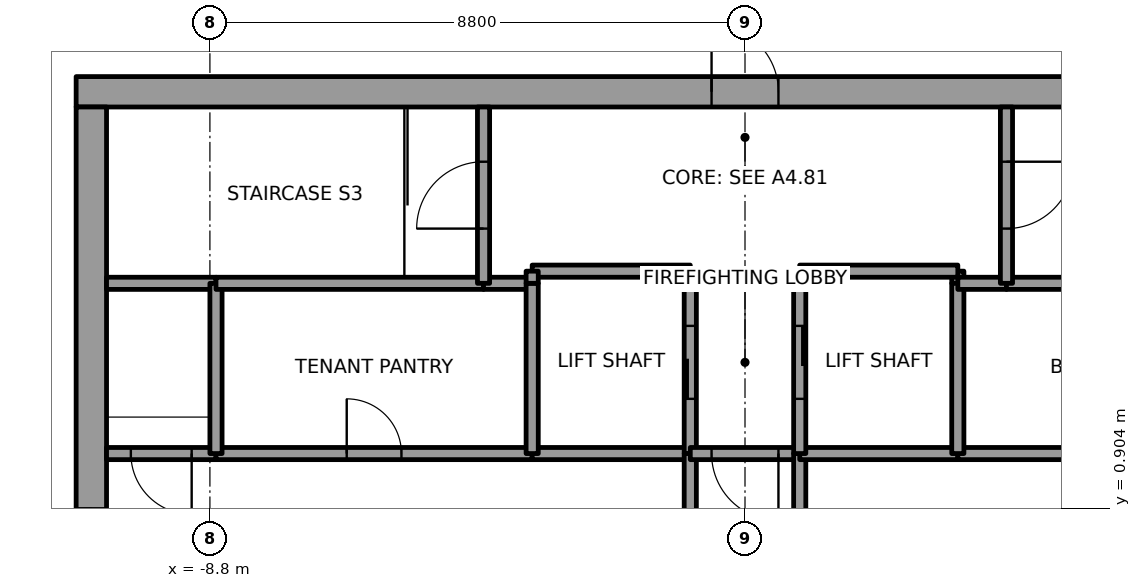
"""IFC4 building model, lengths in metres.
Left out: names, types, materials, properties, quantities, classifications, styles, units other than length and angle.
Written with IfcOpenShell. Run it as: python <this file> out.ifc"""

import sys

from ifc_helpers import new_model, si_unit, direction, frame, frame_2d, origin, place, context, subcontext, project, spatial, rectangle, extrude, element, fill, save


model = new_model("IFC4")
c1 = context("Model", 3, precision=1e-05, world=origin(), true_north=direction((0.0, 1.0)))
c2 = subcontext(c1, "Body", "Model", "MODEL_VIEW")
j1 = project(units=[si_unit("LENGTHUNIT", "METRE"), si_unit("PLANEANGLEUNIT", "RADIAN")], contexts=[c1])
p1 = place(None, origin())
s1 = spatial("IfcSite", under=j1, at=p1, CompositionType="ELEMENT")
p2 = place(p1, origin())
s2 = spatial("IfcBuilding", under=s1, at=p2, CompositionType="ELEMENT")
p3 = place(p2, frame((0.0, 0.0, 355.6)))
s3 = spatial("IfcBuildingStorey", under=s2, at=p3, CompositionType="ELEMENT", Elevation=355.6)
p4 = place(p3, frame((-11.0, 7.75, 0.0), z_axis=(0.0, 0.0, 1.0), x_axis=(1.0, 0.0, 0.0)))
e1 = element("IfcWall", 1, at=p4, inside=s3, PredefinedType="SHEAR", context=c2, shape_type="SweptSolid", body=[
    extrude(rectangle(XDim=22.0, YDim=0.5, at=frame_2d((11.0, 0.0))), origin(), (0.0, 0.0, 1.0), 5.4),
])
p5 = place(p4, frame((10.45, 0.0, 0.0)))
e2 = element("IfcOpeningElement", 2, at=p5, cuts=e1, PredefinedType="OPENING", context=c2, shape_type="SweptSolid", body=[
    extrude(rectangle(XDim=1.1, YDim=2.1, at=frame_2d((0.55, 1.05))), frame((0.0, 0.25, 0.0), z_axis=(0.0, -1.0, 0.0), x_axis=(1.0, 0.0, 0.0)), (0.0, 0.0, 1.0), 0.5),
])
p6 = place(p3, frame((-10.75, -7.5, 0.0), z_axis=(0.0, 0.0, 1.0), x_axis=(0.0, 1.0, 0.0)))
e3 = element("IfcWall", 3, at=p6, inside=s3, PredefinedType="SHEAR", context=c2, shape_type="SweptSolid", body=[
    extrude(rectangle(XDim=15.0, YDim=0.5, at=frame_2d((7.5, 0.0))), origin(), (0.0, 0.0, 1.0), 5.4),
])
p7 = place(p6, frame((6.6, 0.0, 0.0)))
e4 = element("IfcOpeningElement", 4, at=p7, cuts=e3, PredefinedType="OPENING", context=c2, shape_type="SweptSolid", body=[
    extrude(rectangle(XDim=1.8, YDim=2.1, at=frame_2d((0.9, 1.05))), frame((0.0, 0.25, 0.0), z_axis=(0.0, -1.0, 0.0), x_axis=(1.0, 0.0, 0.0)), (0.0, 0.0, 1.0), 0.5),
])
p8 = place(p3, frame((-8.7, 1.8, 0.0), z_axis=(0.0, 0.0, 1.0), x_axis=(-1.0, 0.0, 0.0)))
e5 = element("IfcWall", 5, at=p8, inside=s3, PredefinedType="SOLIDWALL", context=c2, shape_type="SweptSolid", body=[
    extrude(rectangle(XDim=1.8, YDim=0.2, at=frame_2d((0.9, 0.0))), origin(), (0.0, 0.0, 1.0), 5.25),
])
p9 = place(p8, frame((0.4, 0.0, 0.0)))
e6 = element("IfcOpeningElement", 6, at=p9, cuts=e5, PredefinedType="OPENING", context=c2, shape_type="SweptSolid", body=[
    extrude(rectangle(XDim=1.0, YDim=2.1, at=frame_2d((0.5, 1.05))), frame((0.0, 0.1, 0.0), z_axis=(0.0, -1.0, 0.0), x_axis=(1.0, 0.0, 0.0)), (0.0, 0.0, 1.0), 0.2),
])
p10 = place(p3, frame((-8.7, 4.6, 0.0), z_axis=(0.0, 0.0, 1.0), x_axis=(-1.0, 0.0, 0.0)))
e7 = element("IfcWall", 7, at=p10, inside=s3, PredefinedType="SOLIDWALL", context=c2, shape_type="SweptSolid", body=[
    extrude(rectangle(XDim=1.8, YDim=0.2, at=frame_2d((0.9, 0.0))), origin(), (0.0, 0.0, 1.0), 5.25),
])
p11 = place(p3, frame((-8.7, 1.8, 0.0), z_axis=(0.0, 0.0, 1.0), x_axis=(1.0, 0.0, 0.0)))
e8 = element("IfcWall", 8, at=p11, inside=s3, PredefinedType="SOLIDWALL", context=c2, shape_type="SweptSolid", body=[
    extrude(rectangle(XDim=5.2, YDim=0.2, at=frame_2d((2.6, 0.0))), origin(), (0.0, 0.0, 1.0), 5.25),
])
p12 = place(p11, frame((2.15, 0.0, 0.0)))
e9 = element("IfcOpeningElement", 9, at=p12, cuts=e8, PredefinedType="OPENING", context=c2, shape_type="SweptSolid", body=[
    extrude(rectangle(XDim=0.9, YDim=2.1, at=frame_2d((0.45, 1.05))), frame((0.0, 0.1, 0.0), z_axis=(0.0, -1.0, 0.0), x_axis=(1.0, 0.0, 0.0)), (0.0, 0.0, 1.0), 0.2),
])
p13 = place(p3, frame((-8.7, 4.6, 0.0), z_axis=(0.0, 0.0, 1.0), x_axis=(0.0, -1.0, 0.0)))
e10 = element("IfcWall", 10, at=p13, inside=s3, PredefinedType="SOLIDWALL", context=c2, shape_type="SweptSolid", body=[
    extrude(rectangle(XDim=2.8, YDim=0.2, at=frame_2d((1.4, 0.0))), origin(), (0.0, 0.0, 1.0), 5.25),
])
p14 = place(p3, frame((-4.3, 4.6, 0.0), z_axis=(0.0, 0.0, 1.0), x_axis=(-1.0, 0.0, 0.0)))
e11 = element("IfcWall", 11, at=p14, inside=s3, PredefinedType="SOLIDWALL", context=c2, shape_type="SweptSolid", body=[
    extrude(rectangle(XDim=4.4, YDim=0.2, at=frame_2d((2.2, 0.0))), origin(), (0.0, 0.0, 1.0), 5.25),
])
p15 = place(p3, frame((-3.5, 4.6, 0.0), z_axis=(0.0, 0.0, 1.0), x_axis=(-1.0, 0.0, 0.0)))
e12 = element("IfcWall", 12, at=p15, inside=s3, PredefinedType="SOLIDWALL", context=c2, shape_type="SweptSolid", body=[
    extrude(rectangle(XDim=0.8, YDim=0.2, at=frame_2d((0.4, 0.0))), origin(), (0.0, 0.0, 1.0), 5.25),
])
p16 = place(p3, frame((-4.3, 4.6, 0.0), z_axis=(0.0, 0.0, 1.0), x_axis=(0.0, 1.0, 0.0)))
e13 = element("IfcWall", 13, at=p16, inside=s3, PredefinedType="SOLIDWALL", context=c2, shape_type="SweptSolid", body=[
    extrude(rectangle(XDim=2.9, YDim=0.2, at=frame_2d((1.45, 0.0))), origin(), (0.0, 0.0, 1.0), 5.25),
])
p17 = place(p16, frame((0.9, 0.0, 0.0)))
e14 = element("IfcOpeningElement", 14, at=p17, cuts=e13, PredefinedType="OPENING", context=c2, shape_type="SweptSolid", body=[
    extrude(rectangle(XDim=1.1, YDim=2.1, at=frame_2d((0.55, 1.05))), frame((0.0, 0.1, 0.0), z_axis=(0.0, -1.0, 0.0), x_axis=(1.0, 0.0, 0.0)), (0.0, 0.0, 1.0), 0.2),
])
p18 = place(p3, frame((-0.9, 1.8, 0.0), z_axis=(0.0, 0.0, 1.0), x_axis=(-1.0, 0.0, 0.0)))
e15 = element("IfcWall", 15, at=p18, inside=s3, PredefinedType="SOLIDWALL", context=c2, shape_type="SweptSolid", body=[
    extrude(rectangle(XDim=2.6, YDim=0.2, at=frame_2d((1.3, 0.0))), origin(), (0.0, 0.0, 1.0), 5.25),
])
p19 = place(p3, frame((-3.5, 1.8, 0.0), z_axis=(0.0, 0.0, 1.0), x_axis=(0.0, 1.0, 0.0)))
e16 = element("IfcWall", 16, at=p19, inside=s3, PredefinedType="SOLIDWALL", context=c2, shape_type="SweptSolid", body=[
    extrude(rectangle(XDim=2.8, YDim=0.2, at=frame_2d((1.4, 0.0))), origin(), (0.0, 0.0, 1.0), 5.25),
])
p20 = place(p3, frame((-0.9, 1.8, 0.0), z_axis=(0.0, 0.0, 1.0), x_axis=(0.0, 1.0, 0.0)))
e17 = element("IfcWall", 17, at=p20, inside=s3, PredefinedType="SOLIDWALL", context=c2, shape_type="SweptSolid", body=[
    extrude(rectangle(XDim=3.0, YDim=0.2, at=frame_2d((1.5, 0.0))), origin(), (0.0, 0.0, 1.0), 5.25),
])
p21 = place(p20, frame((0.9, 0.0, 0.0)))
e18 = element("IfcOpeningElement", 18, at=p21, cuts=e17, PredefinedType="OPENING", context=c2, shape_type="SweptSolid", body=[
    extrude(rectangle(XDim=1.2, YDim=2.1, at=frame_2d((0.6, 1.05))), frame((0.0, 0.1, 0.0), z_axis=(0.0, -1.0, 0.0), x_axis=(1.0, 0.0, 0.0)), (0.0, 0.0, 1.0), 0.2),
])
p22 = place(p3, frame((-0.9, 4.8, 0.0), z_axis=(0.0, 0.0, 1.0), x_axis=(-1.0, 0.0, 0.0)))
e19 = element("IfcWall", 19, at=p22, inside=s3, PredefinedType="SOLIDWALL", context=c2, shape_type="SweptSolid", body=[
    extrude(rectangle(XDim=2.6, YDim=0.2, at=frame_2d((1.3, 0.0))), origin(), (0.0, 0.0, 1.0), 5.25),
])
p23 = place(p3, frame((-3.5, 4.8, 0.0), z_axis=(0.0, 0.0, 1.0), x_axis=(0.0, -1.0, 0.0)))
e20 = element("IfcWall", 20, at=p23, inside=s3, PredefinedType="SOLIDWALL", context=c2, shape_type="SweptSolid", body=[
    extrude(rectangle(XDim=0.2, YDim=0.2, at=frame_2d((0.1, 0.0))), origin(), (0.0, 0.0, 1.0), 5.25),
])
p24 = place(p3, frame((-0.9, 1.8, 0.0), z_axis=(0.0, 0.0, 1.0), x_axis=(0.0, -1.0, 0.0)))
e21 = element("IfcWall", 21, at=p24, inside=s3, PredefinedType="SOLIDWALL", context=c2, shape_type="SweptSolid", body=[
    extrude(rectangle(XDim=3.6, YDim=0.2, at=frame_2d((1.8, 0.0))), origin(), (0.0, 0.0, 1.0), 5.25),
])
p25 = place(p24, frame((1.05, 0.0, 0.0)))
e22 = element("IfcOpeningElement", 22, at=p25, cuts=e21, PredefinedType="OPENING", context=c2, shape_type="SweptSolid", body=[
    extrude(rectangle(XDim=1.5, YDim=2.1, at=frame_2d((0.75, 1.05))), frame((0.0, 0.1, 0.0), z_axis=(0.0, -1.0, 0.0), x_axis=(1.0, 0.0, 0.0)), (0.0, 0.0, 1.0), 0.2),
])
p26 = place(p3, frame((0.9, 1.8, 0.0), z_axis=(0.0, 0.0, 1.0), x_axis=(-1.0, 0.0, 0.0)))
e23 = element("IfcWall", 23, at=p26, inside=s3, PredefinedType="SOLIDWALL", context=c2, shape_type="SweptSolid", body=[
    extrude(rectangle(XDim=1.8, YDim=0.2, at=frame_2d((0.9, 0.0))), origin(), (0.0, 0.0, 1.0), 5.25),
])
p27 = place(p26, frame((0.35, 0.0, 0.0)))
e24 = element("IfcOpeningElement", 24, at=p27, cuts=e23, PredefinedType="OPENING", context=c2, shape_type="SweptSolid", body=[
    extrude(rectangle(XDim=1.1, YDim=2.1, at=frame_2d((0.55, 1.05))), frame((0.0, 0.1, 0.0), z_axis=(0.0, -1.0, 0.0), x_axis=(1.0, 0.0, 0.0)), (0.0, 0.0, 1.0), 0.2),
])
p28 = place(p3, frame((0.9, -1.8, 0.0), z_axis=(0.0, 0.0, 1.0), x_axis=(0.0, 1.0, 0.0)))
e25 = element("IfcWall", 25, at=p28, inside=s3, PredefinedType="SOLIDWALL", context=c2, shape_type="SweptSolid", body=[
    extrude(rectangle(XDim=3.6, YDim=0.2, at=frame_2d((1.8, 0.0))), origin(), (0.0, 0.0, 1.0), 5.25),
])
p29 = place(p28, frame((1.05, 0.0, 0.0)))
e26 = element("IfcOpeningElement", 26, at=p29, cuts=e25, PredefinedType="OPENING", context=c2, shape_type="SweptSolid", body=[
    extrude(rectangle(XDim=1.5, YDim=2.1, at=frame_2d((0.75, 1.05))), frame((0.0, 0.1, 0.0), z_axis=(0.0, -1.0, 0.0), x_axis=(1.0, 0.0, 0.0)), (0.0, 0.0, 1.0), 0.2),
])
p30 = place(p3, frame((3.5, 1.8, 0.0), z_axis=(0.0, 0.0, 1.0), x_axis=(-1.0, 0.0, 0.0)))
e27 = element("IfcWall", 27, at=p30, inside=s3, PredefinedType="SOLIDWALL", context=c2, shape_type="SweptSolid", body=[
    extrude(rectangle(XDim=2.6, YDim=0.2, at=frame_2d((1.3, 0.0))), origin(), (0.0, 0.0, 1.0), 5.25),
])
p31 = place(p3, frame((3.5, 4.6, 0.0), z_axis=(0.0, 0.0, 1.0), x_axis=(0.0, 1.0, 0.0)))
e28 = element("IfcWall", 28, at=p31, inside=s3, PredefinedType="SOLIDWALL", context=c2, shape_type="SweptSolid", body=[
    extrude(rectangle(XDim=0.2, YDim=0.2, at=frame_2d((0.1, 0.0))), origin(), (0.0, 0.0, 1.0), 5.25),
])
p32 = place(p3, frame((3.5, 4.8, 0.0), z_axis=(0.0, 0.0, 1.0), x_axis=(-1.0, 0.0, 0.0)))
e29 = element("IfcWall", 29, at=p32, inside=s3, PredefinedType="SOLIDWALL", context=c2, shape_type="SweptSolid", body=[
    extrude(rectangle(XDim=2.6, YDim=0.2, at=frame_2d((1.3, 0.0))), origin(), (0.0, 0.0, 1.0), 5.25),
])
p33 = place(p3, frame((0.9, 4.8, 0.0), z_axis=(0.0, 0.0, 1.0), x_axis=(0.0, -1.0, 0.0)))
e30 = element("IfcWall", 30, at=p33, inside=s3, PredefinedType="SOLIDWALL", context=c2, shape_type="SweptSolid", body=[
    extrude(rectangle(XDim=3.0, YDim=0.2, at=frame_2d((1.5, 0.0))), origin(), (0.0, 0.0, 1.0), 5.25),
])
p34 = place(p33, frame((0.9, 0.0, 0.0)))
e31 = element("IfcOpeningElement", 31, at=p34, cuts=e30, PredefinedType="OPENING", context=c2, shape_type="SweptSolid", body=[
    extrude(rectangle(XDim=1.2, YDim=2.1, at=frame_2d((0.6, 1.05))), frame((0.0, 0.1, 0.0), z_axis=(0.0, -1.0, 0.0), x_axis=(1.0, 0.0, 0.0)), (0.0, 0.0, 1.0), 0.2),
])
p35 = place(p3, frame((3.5, 1.8, 0.0), z_axis=(0.0, 0.0, 1.0), x_axis=(1.0, 0.0, 0.0)))
e32 = element("IfcWall", 32, at=p35, inside=s3, PredefinedType="SOLIDWALL", context=c2, shape_type="SweptSolid", body=[
    extrude(rectangle(XDim=5.2, YDim=0.2, at=frame_2d((2.6, 0.0))), origin(), (0.0, 0.0, 1.0), 5.25),
])
p36 = place(p35, frame((2.15, 0.0, 0.0)))
e33 = element("IfcOpeningElement", 33, at=p36, cuts=e32, PredefinedType="OPENING", context=c2, shape_type="SweptSolid", body=[
    extrude(rectangle(XDim=0.9, YDim=2.1, at=frame_2d((0.45, 1.05))), frame((0.0, 0.1, 0.0), z_axis=(0.0, -1.0, 0.0), x_axis=(1.0, 0.0, 0.0)), (0.0, 0.0, 1.0), 0.2),
])
p37 = place(p3, frame((3.5, 4.6, 0.0), z_axis=(0.0, 0.0, 1.0), x_axis=(0.0, -1.0, 0.0)))
e34 = element("IfcWall", 34, at=p37, inside=s3, PredefinedType="SOLIDWALL", context=c2, shape_type="SweptSolid", body=[
    extrude(rectangle(XDim=2.8, YDim=0.2, at=frame_2d((1.4, 0.0))), origin(), (0.0, 0.0, 1.0), 5.25),
])
p38 = place(p3, frame((4.3, 4.6, 0.0), z_axis=(0.0, 0.0, 1.0), x_axis=(-1.0, 0.0, 0.0)))
e35 = element("IfcWall", 35, at=p38, inside=s3, PredefinedType="SOLIDWALL", context=c2, shape_type="SweptSolid", body=[
    extrude(rectangle(XDim=0.8, YDim=0.2, at=frame_2d((0.4, 0.0))), origin(), (0.0, 0.0, 1.0), 5.25),
])
p39 = place(p3, frame((8.7, 4.6, 0.0), z_axis=(0.0, 0.0, 1.0), x_axis=(-1.0, 0.0, 0.0)))
e36 = element("IfcWall", 36, at=p39, inside=s3, PredefinedType="SOLIDWALL", context=c2, shape_type="SweptSolid", body=[
    extrude(rectangle(XDim=4.4, YDim=0.2, at=frame_2d((2.2, 0.0))), origin(), (0.0, 0.0, 1.0), 5.25),
])
p40 = place(p3, frame((4.3, 7.5, 0.0), z_axis=(0.0, 0.0, 1.0), x_axis=(0.0, -1.0, 0.0)))
e37 = element("IfcWall", 37, at=p40, inside=s3, PredefinedType="SOLIDWALL", context=c2, shape_type="SweptSolid", body=[
    extrude(rectangle(XDim=2.9, YDim=0.2, at=frame_2d((1.45, 0.0))), origin(), (0.0, 0.0, 1.0), 5.25),
])
p41 = place(p40, frame((0.9, 0.0, 0.0)))
e38 = element("IfcOpeningElement", 38, at=p41, cuts=e37, PredefinedType="OPENING", context=c2, shape_type="SweptSolid", body=[
    extrude(rectangle(XDim=1.1, YDim=2.1, at=frame_2d((0.55, 1.05))), frame((0.0, 0.1, 0.0), z_axis=(0.0, -1.0, 0.0), x_axis=(1.0, 0.0, 0.0)), (0.0, 0.0, 1.0), 0.2),
])
p42 = place(p21, origin())
e39 = element("IfcDoor", 39, at=p42, inside=s3, OperationType="SLIDING_TO_LEFT", PredefinedType="DOOR", context=c2, shape_type="SweptSolid", body=[
    extrude(rectangle(XDim=1.2, YDim=2.1, at=frame_2d((0.6, 1.05))), frame((0.0, 0.025, 0.0), z_axis=(0.0, -1.0, 0.0), x_axis=(1.0, 0.0, 0.0)), (0.0, 0.0, 1.0), 0.05),
])
fill(e18, e39)
p43 = place(p34, origin())
e40 = element("IfcDoor", 40, at=p43, inside=s3, OperationType="SLIDING_TO_LEFT", PredefinedType="DOOR", context=c2, shape_type="SweptSolid", body=[
    extrude(rectangle(XDim=1.2, YDim=2.1, at=frame_2d((0.6, 1.05))), frame((0.0, 0.025, 0.0), z_axis=(0.0, -1.0, 0.0), x_axis=(1.0, 0.0, 0.0)), (0.0, 0.0, 1.0), 0.05),
])
fill(e31, e40)
p44 = place(p27, origin())
e41 = element("IfcDoor", 41, at=p44, inside=s3, OperationType="SINGLE_SWING_RIGHT", PredefinedType="DOOR", context=c2, shape_type="SweptSolid", body=[
    extrude(rectangle(XDim=1.1, YDim=2.1, at=frame_2d((0.55, 1.05))), frame((0.0, 0.025, 0.0), z_axis=(0.0, -1.0, 0.0), x_axis=(1.0, 0.0, 0.0)), (0.0, 0.0, 1.0), 0.05),
])
fill(e24, e41)
p45 = place(p9, origin())
e42 = element("IfcDoor", 42, at=p45, inside=s3, OperationType="SINGLE_SWING_LEFT", PredefinedType="DOOR", context=c2, shape_type="SweptSolid", body=[
    extrude(rectangle(XDim=1.0, YDim=2.1, at=frame_2d((0.5, 1.05))), frame((0.0, 0.025, 0.0), z_axis=(0.0, -1.0, 0.0), x_axis=(1.0, 0.0, 0.0)), (0.0, 0.0, 1.0), 0.05),
])
fill(e6, e42)
p46 = place(p17, origin())
e43 = element("IfcDoor", 43, at=p46, inside=s3, OperationType="SINGLE_SWING_RIGHT", PredefinedType="DOOR", context=c2, shape_type="SweptSolid", body=[
    extrude(rectangle(XDim=1.1, YDim=2.1, at=frame_2d((0.55, 1.05))), frame((0.0, 0.025, 0.0), z_axis=(0.0, -1.0, 0.0), x_axis=(1.0, 0.0, 0.0)), (0.0, 0.0, 1.0), 0.05),
])
fill(e14, e43)
p47 = place(p41, origin())
e44 = element("IfcDoor", 44, at=p47, inside=s3, OperationType="SINGLE_SWING_RIGHT", PredefinedType="DOOR", context=c2, shape_type="SweptSolid", body=[
    extrude(rectangle(XDim=1.1, YDim=2.1, at=frame_2d((0.55, 1.05))), frame((0.0, 0.025, 0.0), z_axis=(0.0, -1.0, 0.0), x_axis=(1.0, 0.0, 0.0)), (0.0, 0.0, 1.0), 0.05),
])
fill(e38, e44)
p48 = place(p12, origin())
e45 = element("IfcDoor", 45, at=p48, inside=s3, OperationType="SINGLE_SWING_RIGHT", PredefinedType="DOOR", context=c2, shape_type="SweptSolid", body=[
    extrude(rectangle(XDim=0.9, YDim=2.1, at=frame_2d((0.45, 1.05))), frame((0.0, 0.025, 0.0), z_axis=(0.0, -1.0, 0.0), x_axis=(1.0, 0.0, 0.0)), (0.0, 0.0, 1.0), 0.05),
])
fill(e9, e45)
p49 = place(p7, origin())
e46 = element("IfcDoor", 46, at=p49, inside=s3, OperationType="DOUBLE_DOOR_SINGLE_SWING", PredefinedType="DOOR", context=c2, shape_type="SweptSolid", body=[
    extrude(rectangle(XDim=1.8, YDim=2.1, at=frame_2d((0.9, 1.05))), frame((0.0, 0.025, 0.0), z_axis=(0.0, -1.0, 0.0), x_axis=(1.0, 0.0, 0.0)), (0.0, 0.0, 1.0), 0.05),
])
fill(e4, e46)
p50 = place(p5, origin())
e47 = element("IfcDoor", 47, at=p50, inside=s3, OperationType="SINGLE_SWING_LEFT", PredefinedType="DOOR", context=c2, shape_type="SweptSolid", body=[
    extrude(rectangle(XDim=1.1, YDim=2.1, at=frame_2d((0.55, 1.05))), frame((0.0, 0.025, 0.0), z_axis=(0.0, -1.0, 0.0), x_axis=(1.0, 0.0, 0.0)), (0.0, 0.0, 1.0), 0.05),
])
fill(e2, e47)
save(model, sys.argv[1])
